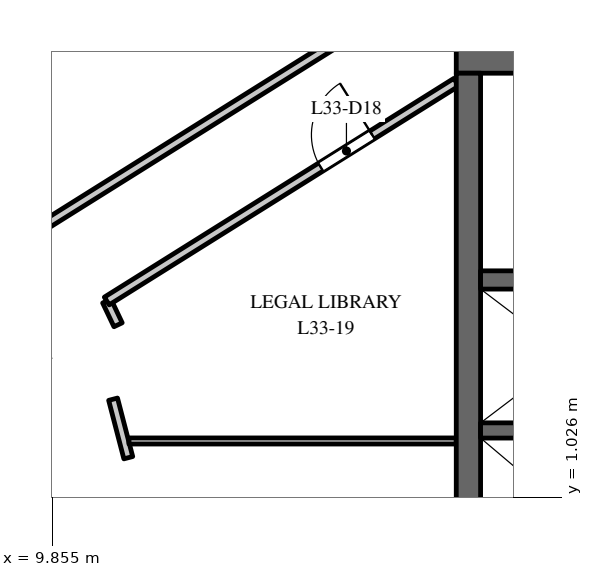
"""IFC4 building model, lengths in metres.
Left out: names, types, materials, properties, quantities, classifications, styles, units other than length and angle.
Written with IfcOpenShell. Run it as: python <this file> out.ifc"""

import sys

from ifc_helpers import new_model, si_unit, direction, frame, frame_2d, origin, place, context, subcontext, project, spatial, rectangle, extrude, element, fill, save


model = new_model("IFC4")
c1 = context("Model", 3, precision=1e-05, world=origin(), true_north=direction((0.0, 1.0)))
c2 = subcontext(c1, "Body", "Model", "MODEL_VIEW")
j1 = project(units=[si_unit("LENGTHUNIT", "METRE"), si_unit("PLANEANGLEUNIT", "RADIAN")], contexts=[c1])
p1 = place(None, origin())
s1 = spatial("IfcSite", under=j1, at=p1, CompositionType="ELEMENT")
p2 = place(p1, origin())
s2 = spatial("IfcBuilding", under=s1, at=p2, CompositionType="ELEMENT")
p3 = place(p2, frame((0.0, 0.0, 146.0)))
s3 = spatial("IfcBuildingStorey", under=s2, at=p3, CompositionType="ELEMENT", Elevation=146.0)
p4 = place(p3, frame((16.5, 8.25, 0.0), z_axis=(0.0, 0.0, 1.0), x_axis=(1.0, 0.0, 0.0)))
e1 = element("IfcWall", 1, at=p4, inside=s3, PredefinedType="SHEAR", context=c2, shape_type="SweptSolid", body=[
    extrude(rectangle(XDim=15.0, YDim=0.5, at=frame_2d((7.5, 0.0))), origin(), (0.0, 0.0, 1.0), 3.7),
])
p5 = place(p4, frame((6.9, 0.0, 0.0)))
e2 = element("IfcOpeningElement", 2, at=p5, cuts=e1, PredefinedType="OPENING", context=c2, shape_type="SweptSolid", body=[
    extrude(rectangle(XDim=1.2, YDim=2.1, at=frame_2d((0.6, 1.05))), frame((0.0, 0.26, 0.0), z_axis=(0.0, -1.0, 0.0), x_axis=(1.0, 0.0, 0.0)), (0.0, 0.0, 1.0), 0.52),
])
p6 = place(p4, frame((12.05, 0.0, 0.0)))
e3 = element("IfcOpeningElement", 3, at=p6, cuts=e1, PredefinedType="OPENING", context=c2, shape_type="SweptSolid", body=[
    extrude(rectangle(XDim=0.9, YDim=2.1, at=frame_2d((0.45, 1.05))), frame((0.0, 0.26, 0.0), z_axis=(0.0, -1.0, 0.0), x_axis=(1.0, 0.0, 0.0)), (0.0, 0.0, 1.0), 0.52),
])
p7 = place(p3, frame((16.7, -8.0, 0.0), z_axis=(0.0, 0.0, 1.0), x_axis=(0.0, 1.0, 0.0)))
e4 = element("IfcWall", 4, at=p7, inside=s3, PredefinedType="SHEAR", context=c2, shape_type="SweptSolid", body=[
    extrude(rectangle(XDim=16.0, YDim=0.4, at=frame_2d((8.0, 0.0))), origin(), (0.0, 0.0, 1.0), 3.7),
])
p8 = place(p3, frame((16.9, 2.125, 0.0), z_axis=(0.0, 0.0, 1.0), x_axis=(1.0, 0.0, 0.0)))
e5 = element("IfcWall", 5, at=p8, inside=s3, PredefinedType="SHEAR", context=c2, shape_type="SweptSolid", body=[
    extrude(rectangle(XDim=2.9, YDim=0.25, at=frame_2d((1.45, 0.0))), origin(), (0.0, 0.0, 1.0), 3.7),
])
p9 = place(p3, frame((16.9, 4.6, 0.0), z_axis=(0.0, 0.0, 1.0), x_axis=(1.0, 0.0, 0.0)))
e6 = element("IfcWall", 6, at=p9, inside=s3, PredefinedType="SHEAR", context=c2, shape_type="SweptSolid", body=[
    extrude(rectangle(XDim=6.18, YDim=0.3, at=frame_2d((3.09, 0.0))), origin(), (0.0, 0.0, 1.0), 3.7),
])
p10 = place(p9, frame((4.9, 0.0, 0.0)))
e7 = element("IfcOpeningElement", 7, at=p10, cuts=e6, PredefinedType="OPENING", context=c2, shape_type="SweptSolid", body=[
    extrude(rectangle(XDim=1.1, YDim=2.1, at=frame_2d((0.55, 1.05))), frame((0.0, 0.16, 0.0), z_axis=(0.0, -1.0, 0.0), x_axis=(1.0, 0.0, 0.0)), (0.0, 0.0, 1.0), 0.32),
])
p11 = place(p3, frame((8.478, 7.111, 0.0), z_axis=(0.0, 0.0, 1.0), x_axis=(0.338361922043, 0.941016051782, 0.0)))
e8 = element("IfcWall", 8, at=p11, inside=s3, PredefinedType="PARTITIONING", context=c2, shape_type="SweptSolid", body=[
    extrude(rectangle(XDim=19.417, YDim=0.1, at=frame_2d((9.708, 0.0))), origin(), (0.0, 0.0, 1.0), 2.85),
])
p12 = place(p3, frame((9.736, 5.505, 0.0), z_axis=(0.0, 0.0, 1.0), x_axis=(0.847611500167, 0.53061732424, 0.0)))
e9 = element("IfcWall", 9, at=p12, inside=s3, PredefinedType="PARTITIONING", context=c2, shape_type="SweptSolid", body=[
    extrude(rectangle(XDim=6.315, YDim=0.15, at=frame_2d((3.158, 0.0))), origin(), (0.0, 0.0, 1.0), 3.7),
])
p13 = place(p3, frame((10.752, 4.254, 0.0), z_axis=(0.0, 0.0, 1.0), x_axis=(0.429758433873, -0.90294390109, 0.0)))
e10 = element("IfcWall", 10, at=p13, inside=s3, PredefinedType="PARTITIONING", context=c2, shape_type="SweptSolid", body=[
    extrude(rectangle(XDim=0.433, YDim=0.15, at=frame_2d((0.216, 0.0))), origin(), (0.0, 0.0, 1.0), 3.7),
])
p14 = place(p3, frame((10.752, 4.254, 0.0), z_axis=(0.0, 0.0, 1.0), x_axis=(0.847690706888, 0.530490777917, 0.0)))
e11 = element("IfcWall", 11, at=p14, inside=s3, PredefinedType="PARTITIONING", context=c2, shape_type="SweptSolid", body=[
    extrude(rectangle(XDim=6.781, YDim=0.15, at=frame_2d((3.39, 0.0))), origin(), (0.0, 0.0, 1.0), 3.7),
])
p15 = place(p14, frame((4.15, 0.0, 0.0)))
e12 = element("IfcOpeningElement", 12, at=p15, cuts=e11, PredefinedType="OPENING", context=c2, shape_type="SweptSolid", body=[
    extrude(rectangle(XDim=1.0, YDim=2.1, at=frame_2d((0.5, 1.05))), frame((0.0, 0.085, 0.0), z_axis=(0.0, -1.0, 0.0), x_axis=(1.0, 0.0, 0.0)), (0.0, 0.0, 1.0), 0.17),
])
p16 = place(p3, frame((10.856, 2.639, 0.0), z_axis=(0.0, 0.0, 1.0), x_axis=(0.251541813796, -0.967846431988, 0.0)))
e13 = element("IfcWall", 13, at=p16, inside=s3, PredefinedType="PARTITIONING", context=c2, shape_type="SweptSolid", body=[
    extrude(rectangle(XDim=0.994, YDim=0.15, at=frame_2d((0.497, 0.0))), origin(), (0.0, 0.0, 1.0), 3.7),
])
p17 = place(p3, frame((11.116, 1.952, 0.0), z_axis=(0.0, 0.0, 1.0), x_axis=(1.0, 0.0, 0.0)))
e14 = element("IfcWall", 14, at=p17, inside=s3, PredefinedType="PARTITIONING", context=c2, shape_type="SweptSolid", body=[
    extrude(rectangle(XDim=5.384, YDim=0.1, at=frame_2d((2.692, 0.0))), origin(), (0.0, 0.0, 1.0), 3.7),
])
p18 = place(p15, origin())
e15 = element("IfcDoor", 15, at=p18, inside=s3, OperationType="SINGLE_SWING_RIGHT", PredefinedType="DOOR", context=c2, shape_type="SweptSolid", body=[
    extrude(rectangle(XDim=1.0, YDim=2.1, at=frame_2d((0.5, 1.05))), frame((0.0, 0.025, 0.0), z_axis=(0.0, -1.0, 0.0), x_axis=(1.0, 0.0, 0.0)), (0.0, 0.0, 1.0), 0.05),
])
fill(e12, e15)
save(model, sys.argv[1])
